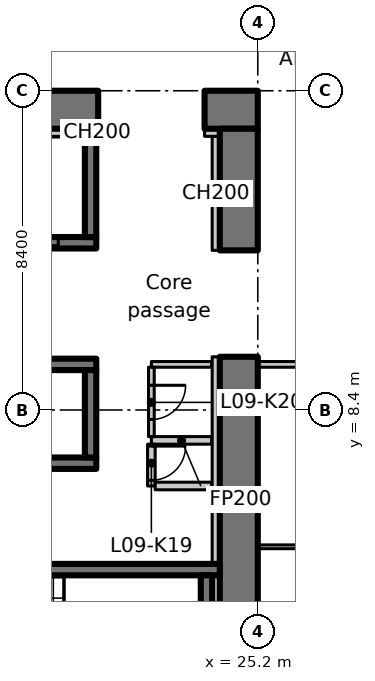
"""IFC4 building model, lengths in metres.
Left out: names, types, materials, properties, quantities, classifications, styles, units other than length and angle.
Written with IfcOpenShell. Run it as: python <this file> out.ifc"""

import sys

from ifc_helpers import new_model, si_unit, direction, frame, frame_2d, origin, place, context, subcontext, project, spatial, rectangle, extrude, element, fill, save


model = new_model("IFC4")
c1 = context("Model", 3, precision=1e-05, world=origin(), true_north=direction((0.0, 1.0)))
c2 = subcontext(c1, "Body", "Model", "MODEL_VIEW")
j1 = project(units=[si_unit("LENGTHUNIT", "METRE"), si_unit("PLANEANGLEUNIT", "RADIAN")], contexts=[c1])
p1 = place(None, origin())
s1 = spatial("IfcSite", under=j1, at=p1, CompositionType="ELEMENT")
p2 = place(p1, origin())
s2 = spatial("IfcBuilding", under=s1, at=p2, CompositionType="ELEMENT")
p3 = place(p2, frame((0.0, 0.0, 47.3)))
s3 = spatial("IfcBuildingStorey", under=s2, at=p3, CompositionType="ELEMENT", Elevation=47.3)
p4 = place(p3, frame((-1.1, 16.3, 0.0), z_axis=(0.0, 0.0, 1.0), x_axis=(1.0, 0.0, 0.0)))
e1 = element("IfcWall", 1, at=p4, inside=s3, PredefinedType="SHEAR", context=c2, shape_type="SweptSolid", body=[
    extrude(rectangle(XDim=22.1, YDim=1.0, at=frame_2d((11.05, 0.0))), origin(), (0.0, 0.0, 1.0), 3.35),
])
p5 = place(p4, frame((3.15, 0.0, 0.0)))
e2 = element("IfcOpeningElement", 2, at=p5, cuts=e1, PredefinedType="OPENING", context=c2, shape_type="SweptSolid", body=[
    extrude(rectangle(XDim=1.1, YDim=2.3, at=frame_2d((0.55, 1.15))), frame((0.0, 0.51, 0.0), z_axis=(0.0, -1.0, 0.0), x_axis=(1.0, 0.0, 0.0)), (0.0, 0.0, 1.0), 1.02),
])
p6 = place(p3, frame((23.8, 16.3, 0.0), z_axis=(0.0, 0.0, 1.0), x_axis=(1.0, 0.0, 0.0)))
e3 = element("IfcWall", 3, at=p6, inside=s3, PredefinedType="SHEAR", context=c2, shape_type="SweptSolid", body=[
    extrude(rectangle(XDim=1.4, YDim=1.0, at=frame_2d((0.7, 0.0))), origin(), (0.0, 0.0, 1.0), 3.35),
])
p7 = place(p3, frame((24.7, 1.0, 0.0), z_axis=(0.0, 0.0, 1.0), x_axis=(0.0, 1.0, 0.0)))
e4 = element("IfcWall", 4, at=p7, inside=s3, PredefinedType="SHEAR", context=c2, shape_type="SweptSolid", body=[
    extrude(rectangle(XDim=8.8, YDim=1.0, at=frame_2d((4.4, 0.0))), origin(), (0.0, 0.0, 1.0), 3.35),
])
p8 = place(p3, frame((24.7, 12.6, 0.0), z_axis=(0.0, 0.0, 1.0), x_axis=(0.0, 1.0, 0.0)))
e5 = element("IfcWall", 5, at=p8, inside=s3, PredefinedType="SHEAR", context=c2, shape_type="SweptSolid", body=[
    extrude(rectangle(XDim=3.2, YDim=1.0, at=frame_2d((1.6, 0.0))), origin(), (0.0, 0.0, 1.0), 3.35),
])
p9 = place(p3, frame((24.1, 12.6, 0.0), z_axis=(0.0, 0.0, 1.0), x_axis=(0.0, 1.0, 0.0)))
e6 = element("IfcWall", 6, at=p9, inside=s3, PredefinedType="PARTITIONING", context=c2, shape_type="SweptSolid", body=[
    extrude(rectangle(XDim=3.0, YDim=0.2, at=frame_2d((1.5, 0.0))), origin(), (0.0, 0.0, 1.0), 3.35),
])
p10 = place(p3, frame((23.8, 15.7, 0.0), z_axis=(0.0, 0.0, 1.0), x_axis=(1.0, 0.0, 0.0)))
e7 = element("IfcWall", 7, at=p10, inside=s3, PredefinedType="PARTITIONING", context=c2, shape_type="SweptSolid", body=[
    extrude(rectangle(XDim=0.4, YDim=0.2, at=frame_2d((0.2, 0.0))), origin(), (0.0, 0.0, 1.0), 3.35),
])
p11 = place(p3, frame((1.0, 7.0, 0.0), z_axis=(0.0, 0.0, 1.0), x_axis=(1.0, 0.0, 0.0)))
e8 = element("IfcWall", 8, at=p11, inside=s3, PredefinedType="SHEAR", context=c2, shape_type="SweptSolid", body=[
    extrude(rectangle(XDim=19.95, YDim=0.3, at=frame_2d((9.975, 0.0))), origin(), (0.0, 0.0, 1.0), 3.35),
])
p12 = place(p3, frame((1.0, 9.6, 0.0), z_axis=(0.0, 0.0, 1.0), x_axis=(1.0, 0.0, 0.0)))
e9 = element("IfcWall", 9, at=p12, inside=s3, PredefinedType="SHEAR", context=c2, shape_type="SweptSolid", body=[
    extrude(rectangle(XDim=19.95, YDim=0.3, at=frame_2d((9.975, 0.0))), origin(), (0.0, 0.0, 1.0), 3.35),
])
p13 = place(p12, frame((1.05, 0.0, 0.0)))
e10 = element("IfcOpeningElement", 10, at=p13, cuts=e9, PredefinedType="OPENING", context=c2, shape_type="SweptSolid", body=[
    extrude(rectangle(XDim=1.1, YDim=2.3, at=frame_2d((0.55, 1.15))), frame((0.0, 0.16, 0.0), z_axis=(0.0, -1.0, 0.0), x_axis=(1.0, 0.0, 0.0)), (0.0, 0.0, 1.0), 0.32),
])
p14 = place(p12, frame((3.85, 0.0, 0.0)))
e11 = element("IfcOpeningElement", 11, at=p14, cuts=e9, PredefinedType="OPENING", context=c2, shape_type="SweptSolid", body=[
    extrude(rectangle(XDim=1.1, YDim=2.3, at=frame_2d((0.55, 1.15))), frame((0.0, 0.16, 0.0), z_axis=(0.0, -1.0, 0.0), x_axis=(1.0, 0.0, 0.0)), (0.0, 0.0, 1.0), 0.32),
])
p15 = place(p12, frame((6.65, 0.0, 0.0)))
e12 = element("IfcOpeningElement", 12, at=p15, cuts=e9, PredefinedType="OPENING", context=c2, shape_type="SweptSolid", body=[
    extrude(rectangle(XDim=1.1, YDim=2.3, at=frame_2d((0.55, 1.15))), frame((0.0, 0.16, 0.0), z_axis=(0.0, -1.0, 0.0), x_axis=(1.0, 0.0, 0.0)), (0.0, 0.0, 1.0), 0.32),
])
p16 = place(p12, frame((9.45, 0.0, 0.0)))
e13 = element("IfcOpeningElement", 13, at=p16, cuts=e9, PredefinedType="OPENING", context=c2, shape_type="SweptSolid", body=[
    extrude(rectangle(XDim=1.1, YDim=2.3, at=frame_2d((0.55, 1.15))), frame((0.0, 0.16, 0.0), z_axis=(0.0, -1.0, 0.0), x_axis=(1.0, 0.0, 0.0)), (0.0, 0.0, 1.0), 0.32),
])
p17 = place(p12, frame((12.25, 0.0, 0.0)))
e14 = element("IfcOpeningElement", 14, at=p17, cuts=e9, PredefinedType="OPENING", context=c2, shape_type="SweptSolid", body=[
    extrude(rectangle(XDim=1.1, YDim=2.3, at=frame_2d((0.55, 1.15))), frame((0.0, 0.16, 0.0), z_axis=(0.0, -1.0, 0.0), x_axis=(1.0, 0.0, 0.0)), (0.0, 0.0, 1.0), 0.32),
])
p18 = place(p12, frame((15.05, 0.0, 0.0)))
e15 = element("IfcOpeningElement", 15, at=p18, cuts=e9, PredefinedType="OPENING", context=c2, shape_type="SweptSolid", body=[
    extrude(rectangle(XDim=1.1, YDim=2.3, at=frame_2d((0.55, 1.15))), frame((0.0, 0.16, 0.0), z_axis=(0.0, -1.0, 0.0), x_axis=(1.0, 0.0, 0.0)), (0.0, 0.0, 1.0), 0.32),
])
p19 = place(p3, frame((20.8, 7.15, 0.0), z_axis=(0.0, 0.0, 1.0), x_axis=(0.0, 1.0, 0.0)))
e16 = element("IfcWall", 16, at=p19, inside=s3, PredefinedType="SHEAR", context=c2, shape_type="SweptSolid", body=[
    extrude(rectangle(XDim=2.3, YDim=0.3, at=frame_2d((1.15, 0.0))), origin(), (0.0, 0.0, 1.0), 3.35),
])
p20 = place(p3, frame((15.05, 12.8, 0.0), z_axis=(0.0, 0.0, 1.0), x_axis=(1.0, 0.0, 0.0)))
e17 = element("IfcWall", 17, at=p20, inside=s3, PredefinedType="SHEAR", context=c2, shape_type="SweptSolid", body=[
    extrude(rectangle(XDim=5.9, YDim=0.3, at=frame_2d((2.95, 0.0))), origin(), (0.0, 0.0, 1.0), 3.35),
])
p21 = place(p20, frame((3.8, 0.0, 0.0)))
e18 = element("IfcOpeningElement", 18, at=p21, cuts=e17, PredefinedType="OPENING", context=c2, shape_type="SweptSolid", body=[
    extrude(rectangle(XDim=1.1, YDim=2.3, at=frame_2d((0.55, 1.15))), frame((0.0, 0.16, 0.0), z_axis=(0.0, -1.0, 0.0), x_axis=(1.0, 0.0, 0.0)), (0.0, 0.0, 1.0), 0.32),
])
p22 = place(p3, frame((20.8, 12.95, 0.0), z_axis=(0.0, 0.0, 1.0), x_axis=(0.0, 1.0, 0.0)))
e19 = element("IfcWall", 19, at=p22, inside=s3, PredefinedType="SHEAR", context=c2, shape_type="SweptSolid", body=[
    extrude(rectangle(XDim=2.85, YDim=0.3, at=frame_2d((1.425, 0.0))), origin(), (0.0, 0.0, 1.0), 3.35),
])
p23 = place(p3, frame((15.8, 4.2, 0.0), z_axis=(0.0, 0.0, 1.0), x_axis=(1.0, 0.0, 0.0)))
e20 = element("IfcWall", 20, at=p23, inside=s3, PredefinedType="SHEAR", context=c2, shape_type="SweptSolid", body=[
    extrude(rectangle(XDim=8.4, YDim=0.3, at=frame_2d((4.2, 0.0))), origin(), (0.0, 0.0, 1.0), 3.35),
])
p24 = place(p23, frame((0.4, 0.0, 0.0)))
e21 = element("IfcOpeningElement", 21, at=p24, cuts=e20, PredefinedType="OPENING", context=c2, shape_type="SweptSolid", body=[
    extrude(rectangle(XDim=1.0, YDim=2.1, at=frame_2d((0.5, 1.05))), frame((0.0, 0.16, 0.0), z_axis=(0.0, -1.0, 0.0), x_axis=(1.0, 0.0, 0.0)), (0.0, 0.0, 1.0), 0.32),
])
p25 = place(p3, frame((23.85, 1.5, 0.0), z_axis=(0.0, 0.0, 1.0), x_axis=(0.0, 1.0, 0.0)))
e22 = element("IfcWall", 22, at=p25, inside=s3, PredefinedType="SHEAR", context=c2, shape_type="SweptSolid", body=[
    extrude(rectangle(XDim=2.55, YDim=0.3, at=frame_2d((1.275, 0.0))), origin(), (0.0, 0.0, 1.0), 3.35),
])
p26 = place(p3, frame((23.988, 7.6, 0.0), z_axis=(0.0, 0.0, 1.0), x_axis=(-1.0, 0.0, 0.0)))
e23 = element("IfcWall", 23, at=p26, inside=s3, PredefinedType="PARTITIONING", context=c2, shape_type="SweptSolid", body=[
    extrude(rectangle(XDim=1.588, YDim=0.2, at=frame_2d((0.794, 0.0))), origin(), (0.0, 0.0, 1.0), 3.35),
])
p27 = place(p3, frame((22.4, 7.5, 0.0), z_axis=(0.0, 0.0, 1.0), x_axis=(0.0, -1.0, 0.0)))
e24 = element("IfcWall", 24, at=p27, inside=s3, PredefinedType="PARTITIONING", context=c2, shape_type="SweptSolid", body=[
    extrude(rectangle(XDim=1.1, YDim=0.2, at=frame_2d((0.55, 0.0))), origin(), (0.0, 0.0, 1.0), 3.35),
])
p28 = place(p27, frame((0.05, 0.0, 0.0)))
e25 = element("IfcOpeningElement", 25, at=p28, cuts=e24, PredefinedType="OPENING", context=c2, shape_type="SweptSolid", body=[
    extrude(rectangle(XDim=0.9, YDim=2.1, at=frame_2d((0.45, 1.05))), frame((0.0, 0.11, 0.0), z_axis=(0.0, -1.0, 0.0), x_axis=(1.0, 0.0, 0.0)), (0.0, 0.0, 1.0), 0.22),
])
p29 = place(p3, frame((22.5, 6.4, 0.0), z_axis=(0.0, 0.0, 1.0), x_axis=(1.0, 0.0, 0.0)))
e26 = element("IfcWall", 26, at=p29, inside=s3, PredefinedType="PARTITIONING", context=c2, shape_type="SweptSolid", body=[
    extrude(rectangle(XDim=1.488, YDim=0.2, at=frame_2d((0.744, 0.0))), origin(), (0.0, 0.0, 1.0), 3.35),
])
p30 = place(p3, frame((23.988, 9.6, 0.0), z_axis=(0.0, 0.0, 1.0), x_axis=(-1.0, 0.0, 0.0)))
e27 = element("IfcWall", 27, at=p30, inside=s3, PredefinedType="PARTITIONING", context=c2, shape_type="SweptSolid", body=[
    extrude(rectangle(XDim=1.588, YDim=0.15, at=frame_2d((0.794, 0.0))), origin(), (0.0, 0.0, 1.0), 3.35),
])
p31 = place(p3, frame((22.4, 9.525, 0.0), z_axis=(0.0, 0.0, 1.0), x_axis=(0.0, -1.0, 0.0)))
e28 = element("IfcWall", 28, at=p31, inside=s3, PredefinedType="PARTITIONING", context=c2, shape_type="SweptSolid", body=[
    extrude(rectangle(XDim=1.825, YDim=0.15, at=frame_2d((0.913, 0.0))), origin(), (0.0, 0.0, 1.0), 3.35),
])
p32 = place(p31, frame((0.475, 0.0, 0.0)))
e29 = element("IfcOpeningElement", 29, at=p32, cuts=e28, PredefinedType="OPENING", context=c2, shape_type="SweptSolid", body=[
    extrude(rectangle(XDim=0.9, YDim=2.1, at=frame_2d((0.45, 1.05))), frame((0.0, 0.085, 0.0), z_axis=(0.0, -1.0, 0.0), x_axis=(1.0, 0.0, 0.0)), (0.0, 0.0, 1.0), 0.17),
])
p33 = place(p3, frame((18.15, 15.7, 0.0), z_axis=(0.0, 0.0, 1.0), x_axis=(1.0, 0.0, 0.0)))
e30 = element("IfcWall", 30, at=p33, inside=s3, PredefinedType="PARTITIONING", context=c2, shape_type="SweptSolid", body=[
    extrude(rectangle(XDim=2.5, YDim=0.2, at=frame_2d((1.25, 0.0))), origin(), (0.0, 0.0, 1.0), 3.35),
])
p34 = place(p3, frame((20.95, 15.7, 0.0), z_axis=(0.0, 0.0, 1.0), x_axis=(1.0, 0.0, 0.0)))
e31 = element("IfcWall", 31, at=p34, inside=s3, PredefinedType="PARTITIONING", context=c2, shape_type="SweptSolid", body=[
    extrude(rectangle(XDim=0.05, YDim=0.2, at=frame_2d((0.025, 0.0))), origin(), (0.0, 0.0, 1.0), 3.35),
])
p35 = place(p3, frame((24.1, 1.5, 0.0), z_axis=(0.0, 0.0, 1.0), x_axis=(0.0, 1.0, 0.0)))
e32 = element("IfcWall", 32, at=p35, inside=s3, PredefinedType="PARTITIONING", context=c2, shape_type="SweptSolid", body=[
    extrude(rectangle(XDim=2.55, YDim=0.2, at=frame_2d((1.275, 0.0))), origin(), (0.0, 0.0, 1.0), 3.35),
])
p36 = place(p3, frame((24.1, 4.35, 0.0), z_axis=(0.0, 0.0, 1.0), x_axis=(0.0, 1.0, 0.0)))
e33 = element("IfcWall", 33, at=p36, inside=s3, PredefinedType="PARTITIONING", context=c2, shape_type="SweptSolid", body=[
    extrude(rectangle(XDim=5.45, YDim=0.2, at=frame_2d((2.725, 0.0))), origin(), (0.0, 0.0, 1.0), 3.35),
])
p37 = place(p3, frame((29.4, 9.6, 0.0), z_axis=(0.0, 0.0, 1.0), x_axis=(-1.0, 0.0, 0.0)))
e34 = element("IfcWall", 34, at=p37, inside=s3, PredefinedType="PARTITIONING", context=c2, shape_type="SweptSolid", body=[
    extrude(rectangle(XDim=4.2, YDim=0.15, at=frame_2d((2.1, 0.0))), origin(), (0.0, 0.0, 1.0), 3.33),
])
p38 = place(p3, frame((25.2, 4.8, 0.0), z_axis=(0.0, 0.0, 1.0), x_axis=(1.0, 0.0, 0.0)))
e35 = element("IfcWall", 35, at=p38, inside=s3, PredefinedType="PARTITIONING", context=c2, shape_type="SweptSolid", body=[
    extrude(rectangle(XDim=4.2, YDim=0.1, at=frame_2d((2.1, 0.0))), origin(), (0.0, 0.0, 1.0), 3.33),
])
p39 = place(p21, origin())
e36 = element("IfcDoor", 36, at=p39, inside=s3, OperationType="SLIDING_TO_LEFT", PredefinedType="DOOR", context=c2, shape_type="SweptSolid", body=[
    extrude(rectangle(XDim=1.1, YDim=2.3, at=frame_2d((0.55, 1.15))), frame((0.0, 0.025, 0.0), z_axis=(0.0, -1.0, 0.0), x_axis=(1.0, 0.0, 0.0)), (0.0, 0.0, 1.0), 0.05),
])
fill(e18, e36)
p40 = place(p28, origin())
e37 = element("IfcDoor", 37, at=p40, inside=s3, OperationType="SINGLE_SWING_RIGHT", PredefinedType="DOOR", context=c2, shape_type="SweptSolid", body=[
    extrude(rectangle(XDim=0.9, YDim=2.1, at=frame_2d((0.45, 1.05))), frame((0.0, 0.025, 0.0), z_axis=(0.0, -1.0, 0.0), x_axis=(1.0, 0.0, 0.0)), (0.0, 0.0, 1.0), 0.05),
])
fill(e25, e37)
p41 = place(p32, origin())
e38 = element("IfcDoor", 38, at=p41, inside=s3, OperationType="SINGLE_SWING_LEFT", PredefinedType="DOOR", context=c2, shape_type="SweptSolid", body=[
    extrude(rectangle(XDim=0.9, YDim=2.1, at=frame_2d((0.45, 1.05))), frame((0.0, 0.025, 0.0), z_axis=(0.0, -1.0, 0.0), x_axis=(1.0, 0.0, 0.0)), (0.0, 0.0, 1.0), 0.05),
])
fill(e29, e38)
save(model, sys.argv[1])
